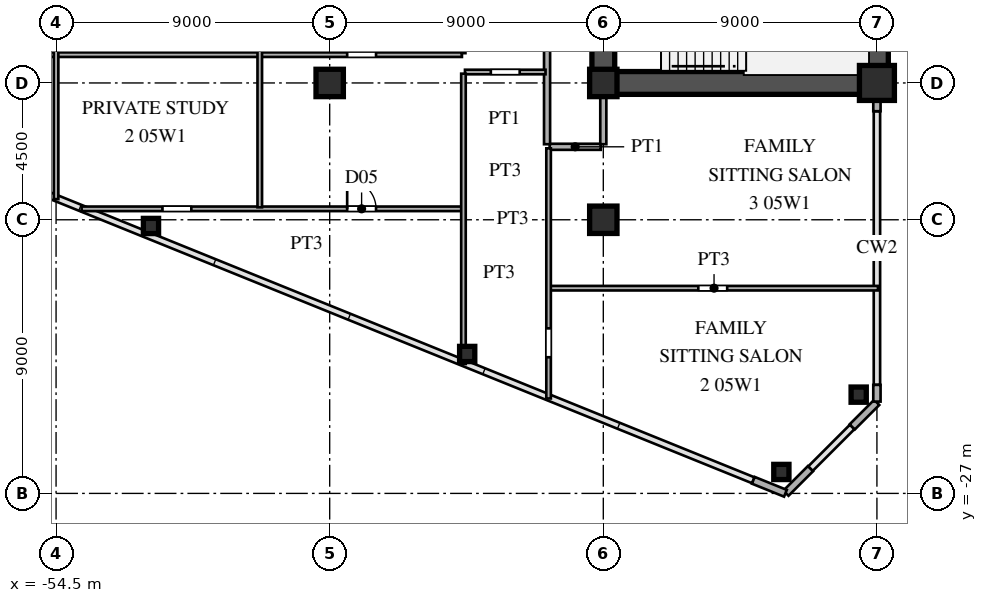
"""IFC4 building model, lengths in metres.
Left out: names, types, materials, properties, quantities, classifications, styles, units other than length and angle.
Written with IfcOpenShell. Run it as: python <this file> out.ifc"""

import sys

from ifc_helpers import new_model, si_unit, direction, frame, frame_2d, origin, origin_2d, place, context, subcontext, project, spatial, rectangle, hollow_rectangle, i_section, extrude, source, transform, mapped, element, fill, save


model = new_model("IFC4")
c1 = context("Model", 3, precision=1e-05, world=origin(), true_north=direction((0.0, 1.0)))
c2 = subcontext(c1, "Body", "Model", "MODEL_VIEW")
j1 = project(units=[si_unit("LENGTHUNIT", "METRE"), si_unit("PLANEANGLEUNIT", "RADIAN")], contexts=[c1])
p1 = place(None, origin())
s1 = spatial("IfcSite", under=j1, at=p1, CompositionType="ELEMENT")
p2 = place(p1, origin())
s2 = spatial("IfcBuilding", under=s1, at=p2, CompositionType="ELEMENT")
p3 = place(p2, frame((0.0, 0.0, 22.5)))
s3 = spatial("IfcBuildingStorey", under=s2, at=p3, CompositionType="ELEMENT", Elevation=22.5)
m1 = source(origin(), c2, "Body", "SweptSolid", [
    extrude(hollow_rectangle(XDim=1.15, YDim=1.15, WallThickness=0.048, at=origin_2d()), origin(), (0.0, 0.0, 1.0), 3.6),
])
p4 = place(p3, frame((-27.5, -13.5, 0.0), z_axis=(0.0, 0.0, 1.0), x_axis=(1.0, 0.0, 0.0)))
e1 = element("IfcColumn", 1, at=p4, inside=s3, PredefinedType="COLUMN", context=c2, shape_type="MappedRepresentation", body=[
    mapped(m1, transform((0.0, 0.0, 0.0), scale=1.0)),
])
m2 = source(origin(), c2, "Body", "SweptSolid", [
    extrude(i_section(OverallWidth=0.9, OverallDepth=0.9, WebThickness=0.036, FlangeThickness=0.055, at=origin_2d()), origin(), (0.0, 0.0, 1.0), 3.6),
])
for number, where, z_axis, x_axis in (
    (2, (-36.5, -18.0, 0.0), (0.0, 0.0, 1.0), (1.0, 0.0, 0.0)),
    (3, (-36.5, -13.5, 0.0), (0.0, 0.0, 1.0), (1.0, 0.0, 0.0)),
    (4, (-45.5, -13.5, 0.0), (0.0, 0.0, 1.0), (1.0, 0.0, 0.0)),
):
    element("IfcColumn", number, at=place(p3, frame(where, z_axis=z_axis, x_axis=x_axis)), inside=s3, PredefinedType="COLUMN", context=c2, shape_type="MappedRepresentation", body=[
        mapped(m2, transform((0.0, 0.0, 0.0), scale=1.0)),
    ])
m3 = source(origin(), c2, "Body", "SweptSolid", [
    extrude(hollow_rectangle(XDim=0.5, YDim=0.5, WallThickness=0.02, at=origin_2d()), origin(), (0.0, 0.0, 1.0), 3.6),
])
for number, where, z_axis, x_axis in (
    (5, (-28.1, -23.751, 0.0), (0.0, 0.0, 1.0), (1.0, 0.0, 0.0)),
    (6, (-30.643, -26.295, 0.0), (0.0, 0.0, 1.0), (1.0, 0.0, 0.0)),
    (7, (-40.977, -22.414, 0.0), (0.0, 0.0, 1.0), (1.0, 0.0, 0.0)),
    (8, (-51.378, -18.204, 0.0), (0.0, 0.0, 1.0), (1.0, 0.0, 0.0)),
):
    element("IfcColumn", number, at=place(p3, frame(where, z_axis=z_axis, x_axis=x_axis)), inside=s3, PredefinedType="COLUMN", context=c2, shape_type="MappedRepresentation", body=[
        mapped(m3, transform((0.0, 0.0, 0.0), scale=1.0)),
    ])
p5 = place(p3, frame((-27.5, -23.98, 0.0), z_axis=(0.0, 0.0, 1.0), x_axis=(0.0, 1.0, 0.0)))
e9 = element("IfcWall", 9, at=p5, inside=s3, PredefinedType="SOLIDWALL", context=c2, shape_type="SweptSolid", body=[
    extrude(rectangle(XDim=0.55, YDim=0.24, at=frame_2d((0.275, 0.0))), origin(), (0.0, 0.0, 1.0), 3.38),
])
p6 = place(p3, frame((-27.5, -14.43, 0.0), z_axis=(0.0, 0.0, 1.0), x_axis=(0.0, 1.0, 0.0)))
e10 = element("IfcWall", 10, at=p6, inside=s3, PredefinedType="SOLIDWALL", context=c2, shape_type="SweptSolid", body=[
    extrude(rectangle(XDim=0.55, YDim=0.24, at=frame_2d((0.275, 0.0))), origin(), (0.0, 0.0, 1.0), 2.88),
])
p7 = place(p3, frame((-31.566, -26.569, 0.0), z_axis=(0.0, 0.0, 1.0), x_axis=(0.927007103665, -0.375043770452, 0.0)))
e11 = element("IfcWall", 11, at=p7, inside=s3, PredefinedType="SOLIDWALL", context=c2, shape_type="SweptSolid", body=[
    extrude(rectangle(XDim=1.14, YDim=0.24, at=frame_2d((0.57, 0.0))), origin(), (0.0, 0.0, 1.0), 3.38),
])
for number, where, z_axis, x_axis in (
    (12, (-30.493, -26.993, 0.0), (0.0, 0.0, 1.0), (0.707, 0.707, 0.0)),
    (13, (-28.313, -24.813, 0.0), (0.0, 0.0, 1.0), (0.707, 0.707, 0.0)),
):
    element("IfcWall", number, at=place(p3, frame(where, z_axis=z_axis, x_axis=x_axis)), inside=s3, PredefinedType="SOLIDWALL", context=c2, shape_type="SweptSolid", body=[
        extrude(rectangle(XDim=1.14, YDim=0.24, at=frame_2d((0.57, 0.0))), origin(), (0.0, 0.0, 1.0), 3.38),
    ])
p8 = place(p3, frame((-27.5, -13.5, 0.0), z_axis=(0.0, 0.0, 1.0), x_axis=(0.0, 1.0, 0.0)))
e14 = element("IfcWall", 14, at=p8, inside=s3, PredefinedType="SHEAR", context=c2, shape_type="SweptSolid", body=[
    extrude(rectangle(XDim=12.2, YDim=0.75, at=frame_2d((6.1, 0.0))), origin(), (0.0, 0.0, 1.0), 3.38),
])
p9 = place(p3, frame((-36.5, -13.5, 0.0), z_axis=(0.0, 0.0, 1.0), x_axis=(1.0, 0.0, 0.0)))
e15 = element("IfcWall", 15, at=p9, inside=s3, PredefinedType="SHEAR", context=c2, shape_type="SweptSolid", body=[
    extrude(rectangle(XDim=9.0, YDim=0.75, at=frame_2d((4.5, 0.0))), origin(), (0.0, 0.0, 1.0), 3.38),
])
p10 = place(p3, frame((-36.5, -13.65, 0.0), z_axis=(0.0, 0.0, 1.0), x_axis=(0.0, 1.0, 0.0)))
e16 = element("IfcWall", 16, at=p10, inside=s3, PredefinedType="SHEAR", context=c2, shape_type="SweptSolid", body=[
    extrude(rectangle(XDim=7.15, YDim=0.75, at=frame_2d((3.575, 0.0))), origin(), (0.0, 0.0, 1.0), 3.38),
])
p11 = place(p10, frame((4.675, 0.0, 0.0)))
e17 = element("IfcOpeningElement", 17, at=p11, cuts=e16, PredefinedType="OPENING", context=c2, shape_type="SweptSolid", body=[
    extrude(rectangle(XDim=1.15, YDim=2.2, at=frame_2d((0.575, 1.1))), frame((0.0, 0.385, 0.0), z_axis=(0.0, -1.0, 0.0), x_axis=(1.0, 0.0, 0.0)), (0.0, 0.0, 1.0), 0.77),
])
p12 = place(p3, frame((-38.25, -20.25, 0.0), z_axis=(0.0, 0.0, 1.0), x_axis=(1.0, 0.0, 0.0)))
e18 = element("IfcWall", 18, at=p12, inside=s3, PredefinedType="PARTITIONING", context=c2, shape_type="SweptSolid", body=[
    extrude(rectangle(XDim=10.785, YDim=0.15, at=frame_2d((5.393, 0.0))), origin(), (0.0, 0.0, 1.0), 3.38),
])
p13 = place(p12, frame((4.875, 0.0, 0.0)))
e19 = element("IfcOpeningElement", 19, at=p13, cuts=e18, PredefinedType="OPENING", context=c2, shape_type="SweptSolid", body=[
    extrude(rectangle(XDim=0.95, YDim=2.15, at=frame_2d((0.475, 1.075))), frame((0.0, 0.085, 0.0), z_axis=(0.0, -1.0, 0.0), x_axis=(1.0, 0.0, 0.0)), (0.0, 0.0, 1.0), 0.17),
])
p14 = place(p3, frame((-53.66, -17.64, 0.0), z_axis=(0.0, 0.0, 1.0), x_axis=(1.0, 0.0, 0.0)))
e20 = element("IfcWall", 20, at=p14, inside=s3, PredefinedType="PARTITIONING", context=c2, shape_type="SweptSolid", body=[
    extrude(rectangle(XDim=12.51, YDim=0.15, at=frame_2d((6.255, 0.0))), origin(), (0.0, 0.0, 1.0), 3.38),
])
p15 = place(p14, frame((8.735, 0.0, 0.0)))
e21 = element("IfcOpeningElement", 21, at=p15, cuts=e20, PredefinedType="OPENING", context=c2, shape_type="SweptSolid", body=[
    extrude(rectangle(XDim=0.95, YDim=2.15, at=frame_2d((0.475, 1.075))), frame((0.0, 0.085, 0.0), z_axis=(0.0, -1.0, 0.0), x_axis=(1.0, 0.0, 0.0)), (0.0, 0.0, 1.0), 0.17),
])
p16 = place(p14, frame((2.659, 0.0, 0.0)))
e22 = element("IfcOpeningElement", 22, at=p16, cuts=e20, PredefinedType="OPENING", context=c2, shape_type="SweptSolid", body=[
    extrude(rectangle(XDim=0.95, YDim=2.15, at=frame_2d((0.475, 1.075))), frame((0.0, 0.085, 0.0), z_axis=(0.0, -1.0, 0.0), x_axis=(1.0, 0.0, 0.0)), (0.0, 0.0, 1.0), 0.17),
])
p17 = place(p3, frame((-38.265, -15.6, 0.0), z_axis=(0.0, 0.0, 1.0), x_axis=(1.0, 0.0, 0.0)))
e23 = element("IfcWall", 23, at=p17, inside=s3, PredefinedType="PARTITIONING", context=c2, shape_type="SweptSolid", body=[
    extrude(rectangle(XDim=1.68, YDim=0.2, at=frame_2d((0.84, 0.0))), origin(), (0.0, 0.0, 1.0), 3.38),
])
p18 = place(p3, frame((-41.05, -13.14, 0.0), z_axis=(0.0, 0.0, 1.0), x_axis=(1.0, 0.0, 0.0)))
e24 = element("IfcWall", 24, at=p18, inside=s3, PredefinedType="PARTITIONING", context=c2, shape_type="SweptSolid", body=[
    extrude(rectangle(XDim=2.65, YDim=0.15, at=frame_2d((1.325, 0.0))), origin(), (0.0, 0.0, 1.0), 3.38),
])
p19 = place(p18, frame((0.85, 0.0, 0.0)))
e25 = element("IfcOpeningElement", 25, at=p19, cuts=e24, PredefinedType="OPENING", context=c2, shape_type="SweptSolid", body=[
    extrude(rectangle(XDim=0.95, YDim=2.15, at=frame_2d((0.475, 1.075))), frame((0.0, 0.085, 0.0), z_axis=(0.0, -1.0, 0.0), x_axis=(1.0, 0.0, 0.0)), (0.0, 0.0, 1.0), 0.17),
])
p20 = place(p3, frame((-66.186, -12.57, 0.0), z_axis=(0.0, 0.0, 1.0), x_axis=(1.0, 0.0, 0.0)))
e26 = element("IfcWall", 26, at=p20, inside=s3, PredefinedType="PARTITIONING", context=c2, shape_type="SweptSolid", body=[
    extrude(rectangle(XDim=25.036, YDim=0.15, at=frame_2d((12.518, 0.0))), origin(), (0.0, 0.0, 1.0), 3.38),
])
p21 = place(p20, frame((21.261, 0.0, 0.0)))
e27 = element("IfcOpeningElement", 27, at=p21, cuts=e26, PredefinedType="OPENING", context=c2, shape_type="SweptSolid", body=[
    extrude(rectangle(XDim=0.95, YDim=2.15, at=frame_2d((0.475, 1.075))), frame((0.0, 0.085, 0.0), z_axis=(0.0, -1.0, 0.0), x_axis=(1.0, 0.0, 0.0)), (0.0, 0.0, 1.0), 0.17),
])
p22 = place(p20, frame((8.361, 0.0, 0.0)))
e28 = element("IfcOpeningElement", 28, at=p22, cuts=e26, PredefinedType="OPENING", context=c2, shape_type="SweptSolid", body=[
    extrude(rectangle(XDim=0.95, YDim=2.15, at=frame_2d((0.475, 1.075))), frame((0.0, 0.085, 0.0), z_axis=(0.0, -1.0, 0.0), x_axis=(1.0, 0.0, 0.0)), (0.0, 0.0, 1.0), 0.17),
])
p23 = place(p3, frame((-54.5, -17.321, 0.0), z_axis=(0.0, 0.0, 1.0), x_axis=(0.0, 1.0, 0.0)))
e29 = element("IfcWall", 29, at=p23, inside=s3, PredefinedType="PARTITIONING", context=c2, shape_type="SweptSolid", body=[
    extrude(rectangle(XDim=34.557, YDim=0.15, at=frame_2d((17.279, 0.0))), origin(), (0.0, 0.0, 1.0), 2.68),
])
p24 = place(p23, frame((6.811, 0.0, 0.0)))
e30 = element("IfcOpeningElement", 30, at=p24, cuts=e29, PredefinedType="OPENING", context=c2, shape_type="SweptSolid", body=[
    extrude(rectangle(XDim=0.95, YDim=2.15, at=frame_2d((0.475, 1.075))), frame((0.0, 0.085, 0.0), z_axis=(0.0, -1.0, 0.0), x_axis=(1.0, 0.0, 0.0)), (0.0, 0.0, 1.0), 0.17),
])
p25 = place(p23, frame((16.346, 0.0, 0.0)))
e31 = element("IfcOpeningElement", 31, at=p25, cuts=e29, PredefinedType="OPENING", context=c2, shape_type="SweptSolid", body=[
    extrude(rectangle(XDim=0.95, YDim=2.15, at=frame_2d((0.475, 1.075))), frame((0.0, 0.085, 0.0), z_axis=(0.0, -1.0, 0.0), x_axis=(1.0, 0.0, 0.0)), (0.0, 0.0, 1.0), 0.17),
])
p26 = place(p23, frame((11.312, 0.0, 0.0)))
e32 = element("IfcOpeningElement", 32, at=p26, cuts=e29, PredefinedType="OPENING", context=c2, shape_type="SweptSolid", body=[
    extrude(rectangle(XDim=0.95, YDim=2.15, at=frame_2d((0.475, 1.075))), frame((0.0, 0.085, 0.0), z_axis=(0.0, -1.0, 0.0), x_axis=(1.0, 0.0, 0.0)), (0.0, 0.0, 1.0), 0.17),
])
p27 = place(p23, frame((20.352, 0.0, 0.0)))
e33 = element("IfcOpeningElement", 33, at=p27, cuts=e29, PredefinedType="OPENING", context=c2, shape_type="SweptSolid", body=[
    extrude(rectangle(XDim=0.95, YDim=2.15, at=frame_2d((0.475, 1.075))), frame((0.0, 0.085, 0.0), z_axis=(0.0, -1.0, 0.0), x_axis=(1.0, 0.0, 0.0)), (0.0, 0.0, 1.0), 0.17),
])
p28 = place(p23, frame((26.048, 0.0, 0.0)))
e34 = element("IfcOpeningElement", 34, at=p28, cuts=e29, PredefinedType="OPENING", context=c2, shape_type="SweptSolid", body=[
    extrude(rectangle(XDim=0.95, YDim=2.15, at=frame_2d((0.475, 1.075))), frame((0.0, 0.085, 0.0), z_axis=(0.0, -1.0, 0.0), x_axis=(1.0, 0.0, 0.0)), (0.0, 0.0, 1.0), 0.17),
])
p29 = place(p3, frame((-47.8, -17.59, 0.0), z_axis=(0.0, 0.0, 1.0), x_axis=(0.0, 1.0, 0.0)))
e35 = element("IfcWall", 35, at=p29, inside=s3, PredefinedType="PARTITIONING", context=c2, shape_type="SweptSolid", body=[
    extrude(rectangle(XDim=34.846, YDim=0.15, at=frame_2d((17.423, 0.0))), origin(), (0.0, 0.0, 1.0), 3.38),
])
p30 = place(p29, frame((7.08, 0.0, 0.0)))
e36 = element("IfcOpeningElement", 36, at=p30, cuts=e35, PredefinedType="OPENING", context=c2, shape_type="SweptSolid", body=[
    extrude(rectangle(XDim=0.95, YDim=2.15, at=frame_2d((0.475, 1.075))), frame((0.0, 0.085, 0.0), z_axis=(0.0, -1.0, 0.0), x_axis=(1.0, 0.0, 0.0)), (0.0, 0.0, 1.0), 0.17),
])
p31 = place(p29, frame((16.615, 0.0, 0.0)))
e37 = element("IfcOpeningElement", 37, at=p31, cuts=e35, PredefinedType="OPENING", context=c2, shape_type="SweptSolid", body=[
    extrude(rectangle(XDim=0.95, YDim=2.15, at=frame_2d((0.475, 1.075))), frame((0.0, 0.085, 0.0), z_axis=(0.0, -1.0, 0.0), x_axis=(1.0, 0.0, 0.0)), (0.0, 0.0, 1.0), 0.17),
])
p32 = place(p29, frame((26.317, 0.0, 0.0)))
e38 = element("IfcOpeningElement", 38, at=p32, cuts=e35, PredefinedType="OPENING", context=c2, shape_type="SweptSolid", body=[
    extrude(rectangle(XDim=0.95, YDim=2.15, at=frame_2d((0.475, 1.075))), frame((0.0, 0.085, 0.0), z_axis=(0.0, -1.0, 0.0), x_axis=(1.0, 0.0, 0.0)), (0.0, 0.0, 1.0), 0.17),
])
p33 = place(p3, frame((-41.1, -22.744, 0.0), z_axis=(0.0, 0.0, 1.0), x_axis=(0.0, 1.0, 0.0)))
e39 = element("IfcWall", 39, at=p33, inside=s3, PredefinedType="PARTITIONING", context=c2, shape_type="SweptSolid", body=[
    extrude(rectangle(XDim=9.549, YDim=0.15, at=frame_2d((4.774, 0.0))), origin(), (0.0, 0.0, 1.0), 3.38),
])
p34 = place(p3, frame((-41.1, -12.52, 0.0), z_axis=(0.0, 0.0, 1.0), x_axis=(0.0, 1.0, 0.0)))
e40 = element("IfcWall", 40, at=p34, inside=s3, PredefinedType="PARTITIONING", context=c2, shape_type="SweptSolid", body=[
    extrude(rectangle(XDim=14.303, YDim=0.13, at=frame_2d((7.151, 0.0))), origin(), (0.0, 0.0, 1.0), 3.38),
])
p35 = place(p34, frame((0.688, 0.0, 0.0)))
e41 = element("IfcOpeningElement", 41, at=p35, cuts=e40, PredefinedType="OPENING", context=c2, shape_type="SweptSolid", body=[
    extrude(rectangle(XDim=0.95, YDim=2.15, at=frame_2d((0.475, 1.075))), frame((0.0, 0.075, 0.0), z_axis=(0.0, -1.0, 0.0), x_axis=(1.0, 0.0, 0.0)), (0.0, 0.0, 1.0), 0.15),
])
p36 = place(p34, frame((11.545, 0.0, 0.0)))
e42 = element("IfcOpeningElement", 42, at=p36, cuts=e40, PredefinedType="OPENING", context=c2, shape_type="SweptSolid", body=[
    extrude(rectangle(XDim=0.95, YDim=2.15, at=frame_2d((0.475, 1.075))), frame((0.0, 0.075, 0.0), z_axis=(0.0, -1.0, 0.0), x_axis=(1.0, 0.0, 0.0)), (0.0, 0.0, 1.0), 0.15),
])
p37 = place(p3, frame((-38.35, -15.515, 0.0), z_axis=(0.0, 0.0, 1.0), x_axis=(0.0, 1.0, 0.0)))
e43 = element("IfcWall", 43, at=p37, inside=s3, PredefinedType="PARTITIONING", context=c2, shape_type="SweptSolid", body=[
    extrude(rectangle(XDim=31.03, YDim=0.2, at=frame_2d((15.515, 0.0))), origin(), (0.0, 0.0, 1.0), 3.38),
])
p38 = place(p37, frame((3.345, 0.0, 0.0)))
e44 = element("IfcOpeningElement", 44, at=p38, cuts=e43, PredefinedType="OPENING", context=c2, shape_type="SweptSolid", body=[
    extrude(rectangle(XDim=1.05, YDim=2.25, at=frame_2d((0.525, 1.125))), frame((0.0, 0.11, 0.0), z_axis=(0.0, -1.0, 0.0), x_axis=(1.0, 0.0, 0.0)), (0.0, 0.0, 1.0), 0.22),
])
p39 = place(p37, frame((14.28, 0.0, 0.0)))
e45 = element("IfcOpeningElement", 45, at=p39, cuts=e43, PredefinedType="OPENING", context=c2, shape_type="SweptSolid", body=[
    extrude(rectangle(XDim=1.05, YDim=2.25, at=frame_2d((0.525, 1.125))), frame((0.0, 0.11, 0.0), z_axis=(0.0, -1.0, 0.0), x_axis=(1.0, 0.0, 0.0)), (0.0, 0.0, 1.0), 0.22),
])
p40 = place(p37, frame((26.067, 0.0, 0.0)))
e46 = element("IfcOpeningElement", 46, at=p40, cuts=e43, PredefinedType="OPENING", context=c2, shape_type="SweptSolid", body=[
    extrude(rectangle(XDim=1.05, YDim=2.25, at=frame_2d((0.525, 1.125))), frame((0.0, 0.11, 0.0), z_axis=(0.0, -1.0, 0.0), x_axis=(1.0, 0.0, 0.0)), (0.0, 0.0, 1.0), 0.22),
])
p41 = place(p3, frame((-38.3, -23.878, 0.0), z_axis=(0.0, 0.0, 1.0), x_axis=(0.0, 1.0, 0.0)))
e47 = element("IfcWall", 47, at=p41, inside=s3, PredefinedType="PARTITIONING", context=c2, shape_type="SweptSolid", body=[
    extrude(rectangle(XDim=8.228, YDim=0.15, at=frame_2d((4.114, 0.0))), origin(), (0.0, 0.0, 1.0), 3.38),
])
p42 = place(p41, frame((1.357, 0.0, 0.0)))
e48 = element("IfcOpeningElement", 48, at=p42, cuts=e47, PredefinedType="OPENING", context=c2, shape_type="SweptSolid", body=[
    extrude(rectangle(XDim=0.95, YDim=2.15, at=frame_2d((0.475, 1.075))), frame((0.0, 0.085, 0.0), z_axis=(0.0, -1.0, 0.0), x_axis=(1.0, 0.0, 0.0)), (0.0, 0.0, 1.0), 0.17),
])
p43 = place(p3, frame((-36.5, -15.515, 0.0), z_axis=(0.0, 0.0, 1.0), x_axis=(0.0, 1.0, 0.0)))
e49 = element("IfcWall", 49, at=p43, inside=s3, PredefinedType="PARTITIONING", context=c2, shape_type="SweptSolid", body=[
    extrude(rectangle(XDim=1.635, YDim=0.2, at=frame_2d((0.817, 0.0))), origin(), (0.0, 0.0, 1.0), 2.68),
])
m4 = source(origin(), c2, "Body", "SweptSolid", [
    extrude(rectangle(XDim=0.95, YDim=2.15, at=frame_2d((0.475, 1.075))), frame((0.0, 0.025, 0.0), z_axis=(0.0, -1.0, 0.0), x_axis=(1.0, 0.0, 0.0)), (0.0, 0.0, 1.0), 0.05),
])
p44 = place(p15, origin())
e50 = element("IfcDoor", 50, at=p44, inside=s3, OperationType="SINGLE_SWING_LEFT", PredefinedType="DOOR", context=c2, shape_type="MappedRepresentation", body=[
    mapped(m4, transform((0.0, 0.0, 0.0), scale=1.0)),
])
fill(e21, e50)
save(model, sys.argv[1])
